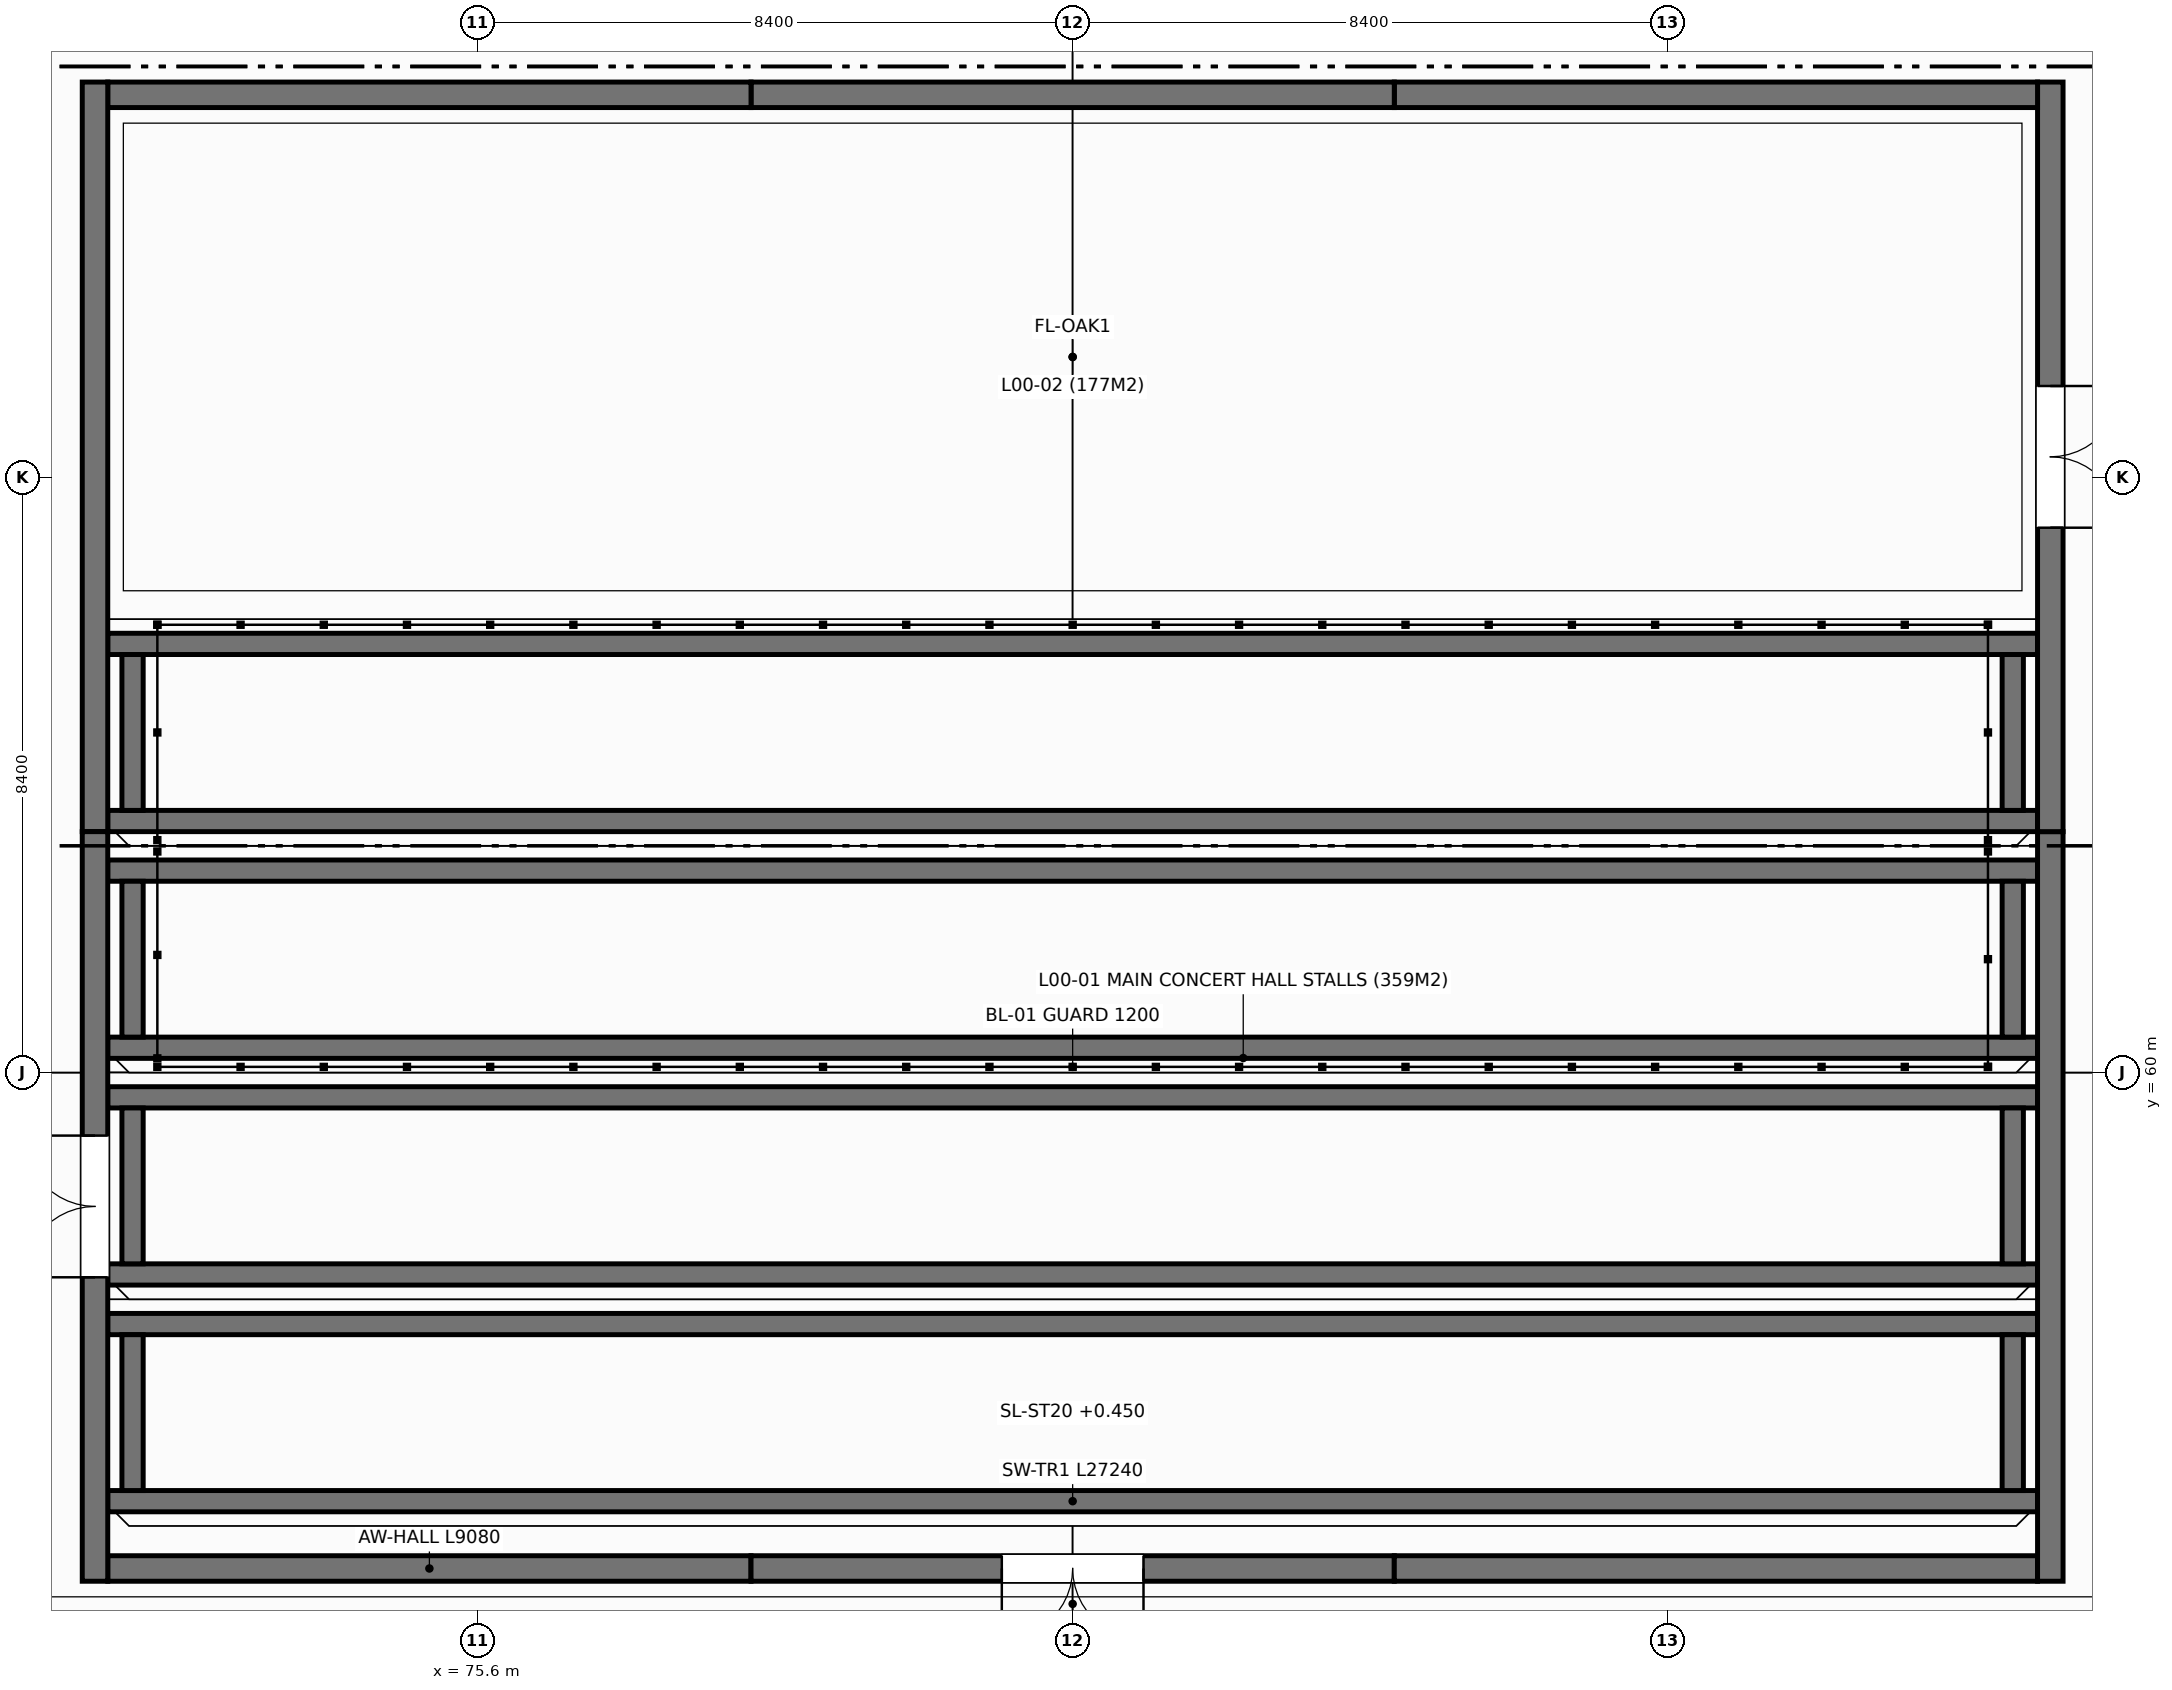
"""IFC4 building model, lengths in metres.
Left out: names, types, materials, properties, quantities, classifications, styles, units other than length and angle.
Written with IfcOpenShell. Run it as: python <this file> out.ifc"""

import sys

from ifc_helpers import new_model, si_unit, direction, frame, frame_2d, origin, place, context, subcontext, project, spatial, rectangle, extrude, element, fill, save


model = new_model("IFC4")
c1 = context("Model", 3, precision=1e-05, world=origin(), true_north=direction((0.0, 1.0)))
c2 = subcontext(c1, "Body", "Model", "MODEL_VIEW")
j1 = project(units=[si_unit("LENGTHUNIT", "METRE"), si_unit("PLANEANGLEUNIT", "RADIAN")], contexts=[c1])
p1 = place(None, origin())
s1 = spatial("IfcSite", under=j1, at=p1, CompositionType="ELEMENT")
p2 = place(p1, origin())
s2 = spatial("IfcBuilding", under=s1, at=p2, CompositionType="ELEMENT")
p3 = place(p2, origin())
s3 = spatial("IfcBuildingStorey", under=s2, at=p3, CompositionType="ELEMENT", Elevation=0.0)
for number, where, z_axis, x_axis in (
    (1, (70.38, 53.95, 0.0), (0.0, 0.0, 1.0), (1.0, 0.0, 0.0)),
    (2, (70.38, 56.45, 0.0), (0.0, 0.0, 1.0), (1.0, 0.0, 0.0)),
):
    element("IfcWall", number, at=place(p3, frame(where, z_axis=z_axis, x_axis=x_axis)), inside=s3, PredefinedType="SHEAR", context=c2, shape_type="SweptSolid", body=[
        extrude(rectangle(XDim=27.24, YDim=0.3, at=frame_2d((13.62, 0.0))), origin(), (0.0, 0.0, 1.0), 0.25),
    ])
for number, where, z_axis, x_axis in (
    (3, (70.73, 54.1, 0.0), (0.0, 0.0, 1.0), (0.0, 1.0, 0.0)),
    (4, (97.27, 54.1, 0.0), (0.0, 0.0, 1.0), (0.0, 1.0, 0.0)),
):
    element("IfcWall", number, at=place(p3, frame(where, z_axis=z_axis, x_axis=x_axis)), inside=s3, PredefinedType="SHEAR", context=c2, shape_type="SweptSolid", body=[
        extrude(rectangle(XDim=2.2, YDim=0.3, at=frame_2d((1.1, 0.0))), origin(), (0.0, 0.0, 1.0), 0.25),
    ])
for number, where, z_axis, x_axis in (
    (5, (70.38, 57.15, 0.0), (0.0, 0.0, 1.0), (1.0, 0.0, 0.0)),
    (6, (70.38, 59.65, 0.0), (0.0, 0.0, 1.0), (1.0, 0.0, 0.0)),
):
    element("IfcWall", number, at=place(p3, frame(where, z_axis=z_axis, x_axis=x_axis)), inside=s3, PredefinedType="SHEAR", context=c2, shape_type="SweptSolid", body=[
        extrude(rectangle(XDim=27.24, YDim=0.3, at=frame_2d((13.62, 0.0))), origin(), (0.0, 0.0, 1.0), 0.65),
    ])
for number, where, z_axis, x_axis in (
    (7, (70.73, 57.3, 0.0), (0.0, 0.0, 1.0), (0.0, 1.0, 0.0)),
    (8, (97.27, 57.3, 0.0), (0.0, 0.0, 1.0), (0.0, 1.0, 0.0)),
):
    element("IfcWall", number, at=place(p3, frame(where, z_axis=z_axis, x_axis=x_axis)), inside=s3, PredefinedType="SHEAR", context=c2, shape_type="SweptSolid", body=[
        extrude(rectangle(XDim=2.2, YDim=0.3, at=frame_2d((1.1, 0.0))), origin(), (0.0, 0.0, 1.0), 0.65),
    ])
for number, where, z_axis, x_axis in (
    (9, (70.38, 60.35, 0.0), (0.0, 0.0, 1.0), (1.0, 0.0, 0.0)),
    (10, (70.38, 62.85, 0.0), (0.0, 0.0, 1.0), (1.0, 0.0, 0.0)),
):
    element("IfcWall", number, at=place(p3, frame(where, z_axis=z_axis, x_axis=x_axis)), inside=s3, PredefinedType="SHEAR", context=c2, shape_type="SweptSolid", body=[
        extrude(rectangle(XDim=27.24, YDim=0.3, at=frame_2d((13.62, 0.0))), origin(), (0.0, 0.0, 1.0), 1.05),
    ])
for number, where, z_axis, x_axis in (
    (11, (70.73, 60.5, 0.0), (0.0, 0.0, 1.0), (0.0, 1.0, 0.0)),
    (12, (97.27, 60.5, 0.0), (0.0, 0.0, 1.0), (0.0, 1.0, 0.0)),
):
    element("IfcWall", number, at=place(p3, frame(where, z_axis=z_axis, x_axis=x_axis)), inside=s3, PredefinedType="SHEAR", context=c2, shape_type="SweptSolid", body=[
        extrude(rectangle(XDim=2.2, YDim=0.3, at=frame_2d((1.1, 0.0))), origin(), (0.0, 0.0, 1.0), 1.05),
    ])
for number, where, z_axis, x_axis in (
    (13, (70.38, 63.55, 0.0), (0.0, 0.0, 1.0), (1.0, 0.0, 0.0)),
    (14, (70.38, 66.05, 0.0), (0.0, 0.0, 1.0), (1.0, 0.0, 0.0)),
):
    element("IfcWall", number, at=place(p3, frame(where, z_axis=z_axis, x_axis=x_axis)), inside=s3, PredefinedType="SHEAR", context=c2, shape_type="SweptSolid", body=[
        extrude(rectangle(XDim=27.24, YDim=0.3, at=frame_2d((13.62, 0.0))), origin(), (0.0, 0.0, 1.0), 1.45),
    ])
for number, where, z_axis, x_axis in (
    (15, (70.73, 63.7, 0.0), (0.0, 0.0, 1.0), (0.0, 1.0, 0.0)),
    (16, (97.27, 63.7, 0.0), (0.0, 0.0, 1.0), (0.0, 1.0, 0.0)),
):
    element("IfcWall", number, at=place(p3, frame(where, z_axis=z_axis, x_axis=x_axis)), inside=s3, PredefinedType="SHEAR", context=c2, shape_type="SweptSolid", body=[
        extrude(rectangle(XDim=2.2, YDim=0.3, at=frame_2d((1.1, 0.0))), origin(), (0.0, 0.0, 1.0), 1.45),
    ])
p4 = place(p3, frame((70.38, 53.0, 0.0), z_axis=(0.0, 0.0, 1.0), x_axis=(1.0, 0.0, 0.0)))
e17 = element("IfcWall", 17, at=p4, inside=s3, PredefinedType="SHEAR", context=c2, shape_type="SweptSolid", body=[
    extrude(rectangle(XDim=9.08, YDim=0.36, at=frame_2d((4.54, 0.0))), origin(), (0.0, 0.0, 1.0), 4.8),
])
p5 = place(p3, frame((79.46, 53.0, 0.0), z_axis=(0.0, 0.0, 1.0), x_axis=(1.0, 0.0, 0.0)))
e18 = element("IfcWall", 18, at=p5, inside=s3, PredefinedType="SHEAR", context=c2, shape_type="SweptSolid", body=[
    extrude(rectangle(XDim=9.08, YDim=0.36, at=frame_2d((4.54, 0.0))), origin(), (0.0, 0.0, 1.0), 4.8),
])
p6 = place(p5, frame((3.54, 0.0, 0.0)))
e19 = element("IfcOpeningElement", 19, at=p6, cuts=e18, PredefinedType="OPENING", context=c2, shape_type="SweptSolid", body=[
    extrude(rectangle(XDim=2.0, YDim=2.25, at=frame_2d((1.0, 1.125))), frame((0.0, 0.19, 0.0), z_axis=(0.0, -1.0, 0.0), x_axis=(1.0, 0.0, 0.0)), (0.0, 0.0, 1.0), 0.38),
])
p7 = place(p3, frame((88.54, 53.0, 0.0), z_axis=(0.0, 0.0, 1.0), x_axis=(1.0, 0.0, 0.0)))
e20 = element("IfcWall", 20, at=p7, inside=s3, PredefinedType="SHEAR", context=c2, shape_type="SweptSolid", body=[
    extrude(rectangle(XDim=9.08, YDim=0.36, at=frame_2d((4.54, 0.0))), origin(), (0.0, 0.0, 1.0), 4.8),
])
p8 = place(p3, frame((97.8, 52.82, 0.0), z_axis=(0.0, 0.0, 1.0), x_axis=(0.0, 1.0, 0.0)))
e21 = element("IfcWall", 21, at=p8, inside=s3, PredefinedType="SHEAR", context=c2, shape_type="SweptSolid", body=[
    extrude(rectangle(XDim=10.58, YDim=0.36, at=frame_2d((5.29, 0.0))), origin(), (0.0, 0.0, 1.0), 4.8),
])
p9 = place(p3, frame((97.8, 63.4, 0.0), z_axis=(0.0, 0.0, 1.0), x_axis=(0.0, 1.0, 0.0)))
e22 = element("IfcWall", 22, at=p9, inside=s3, PredefinedType="SHEAR", context=c2, shape_type="SweptSolid", body=[
    extrude(rectangle(XDim=10.58, YDim=0.36, at=frame_2d((5.29, 0.0))), origin(), (0.0, 0.0, 1.0), 4.8),
])
p10 = place(p9, frame((4.29, 0.0, 0.0)))
e23 = element("IfcOpeningElement", 23, at=p10, cuts=e22, PredefinedType="OPENING", context=c2, shape_type="SweptSolid", body=[
    extrude(rectangle(XDim=2.0, YDim=2.25, at=frame_2d((1.0, 1.125))), frame((0.0, 0.19, 0.0), z_axis=(0.0, -1.0, 0.0), x_axis=(1.0, 0.0, 0.0)), (0.0, 0.0, 1.0), 0.38),
])
for number, where, z_axis, x_axis in (
    (24, (97.62, 73.8, 0.0), (0.0, 0.0, 1.0), (-1.0, 0.0, 0.0)),
    (25, (88.54, 73.8, 0.0), (0.0, 0.0, 1.0), (-1.0, 0.0, 0.0)),
    (26, (79.46, 73.8, 0.0), (0.0, 0.0, 1.0), (-1.0, 0.0, 0.0)),
):
    element("IfcWall", number, at=place(p3, frame(where, z_axis=z_axis, x_axis=x_axis)), inside=s3, PredefinedType="SHEAR", context=c2, shape_type="SweptSolid", body=[
        extrude(rectangle(XDim=9.08, YDim=0.36, at=frame_2d((4.54, 0.0))), origin(), (0.0, 0.0, 1.0), 4.8),
    ])
p11 = place(p3, frame((70.2, 73.98, 0.0), z_axis=(0.0, 0.0, 1.0), x_axis=(0.0, -1.0, 0.0)))
e27 = element("IfcWall", 27, at=p11, inside=s3, PredefinedType="SHEAR", context=c2, shape_type="SweptSolid", body=[
    extrude(rectangle(XDim=10.58, YDim=0.36, at=frame_2d((5.29, 0.0))), origin(), (0.0, 0.0, 1.0), 4.8),
])
p12 = place(p3, frame((70.2, 63.4, 0.0), z_axis=(0.0, 0.0, 1.0), x_axis=(0.0, -1.0, 0.0)))
e28 = element("IfcWall", 28, at=p12, inside=s3, PredefinedType="SHEAR", context=c2, shape_type="SweptSolid", body=[
    extrude(rectangle(XDim=10.58, YDim=0.36, at=frame_2d((5.29, 0.0))), origin(), (0.0, 0.0, 1.0), 4.8),
])
p13 = place(p12, frame((4.29, 0.0, 0.0)))
e29 = element("IfcOpeningElement", 29, at=p13, cuts=e28, PredefinedType="OPENING", context=c2, shape_type="SweptSolid", body=[
    extrude(rectangle(XDim=2.0, YDim=2.25, at=frame_2d((1.0, 1.125))), frame((0.0, 0.19, 0.0), z_axis=(0.0, -1.0, 0.0), x_axis=(1.0, 0.0, 0.0)), (0.0, 0.0, 1.0), 0.38),
])
p14 = place(p6, frame((2.0, 0.0, 0.0), z_axis=(0.0, 0.0, 1.0), x_axis=(-1.0, 0.0, 0.0)))
e30 = element("IfcDoor", 30, at=p14, inside=s3, OperationType="DOUBLE_DOOR_SINGLE_SWING", PredefinedType="DOOR", context=c2, shape_type="SweptSolid", body=[
    extrude(rectangle(XDim=2.0, YDim=2.25, at=frame_2d((1.0, 1.125))), frame((0.0, 0.025, 0.0), z_axis=(0.0, -1.0, 0.0), x_axis=(1.0, 0.0, 0.0)), (0.0, 0.0, 1.0), 0.05),
])
fill(e19, e30)
p15 = place(p10, frame((2.0, 0.0, 0.0), z_axis=(0.0, 0.0, 1.0), x_axis=(-1.0, 0.0, 0.0)))
e31 = element("IfcDoor", 31, at=p15, inside=s3, OperationType="DOUBLE_DOOR_SINGLE_SWING", PredefinedType="DOOR", context=c2, shape_type="SweptSolid", body=[
    extrude(rectangle(XDim=2.0, YDim=2.25, at=frame_2d((1.0, 1.125))), frame((0.0, 0.025, 0.0), z_axis=(0.0, -1.0, 0.0), x_axis=(1.0, 0.0, 0.0)), (0.0, 0.0, 1.0), 0.05),
])
fill(e23, e31)
p16 = place(p13, frame((2.0, 0.0, 0.0), z_axis=(0.0, 0.0, 1.0), x_axis=(-1.0, 0.0, 0.0)))
e32 = element("IfcDoor", 32, at=p16, inside=s3, OperationType="DOUBLE_DOOR_SINGLE_SWING", PredefinedType="DOOR", context=c2, shape_type="SweptSolid", body=[
    extrude(rectangle(XDim=2.0, YDim=2.25, at=frame_2d((1.0, 1.125))), frame((0.0, 0.025, 0.0), z_axis=(0.0, -1.0, 0.0), x_axis=(1.0, 0.0, 0.0)), (0.0, 0.0, 1.0), 0.05),
])
fill(e29, e32)
save(model, sys.argv[1])
